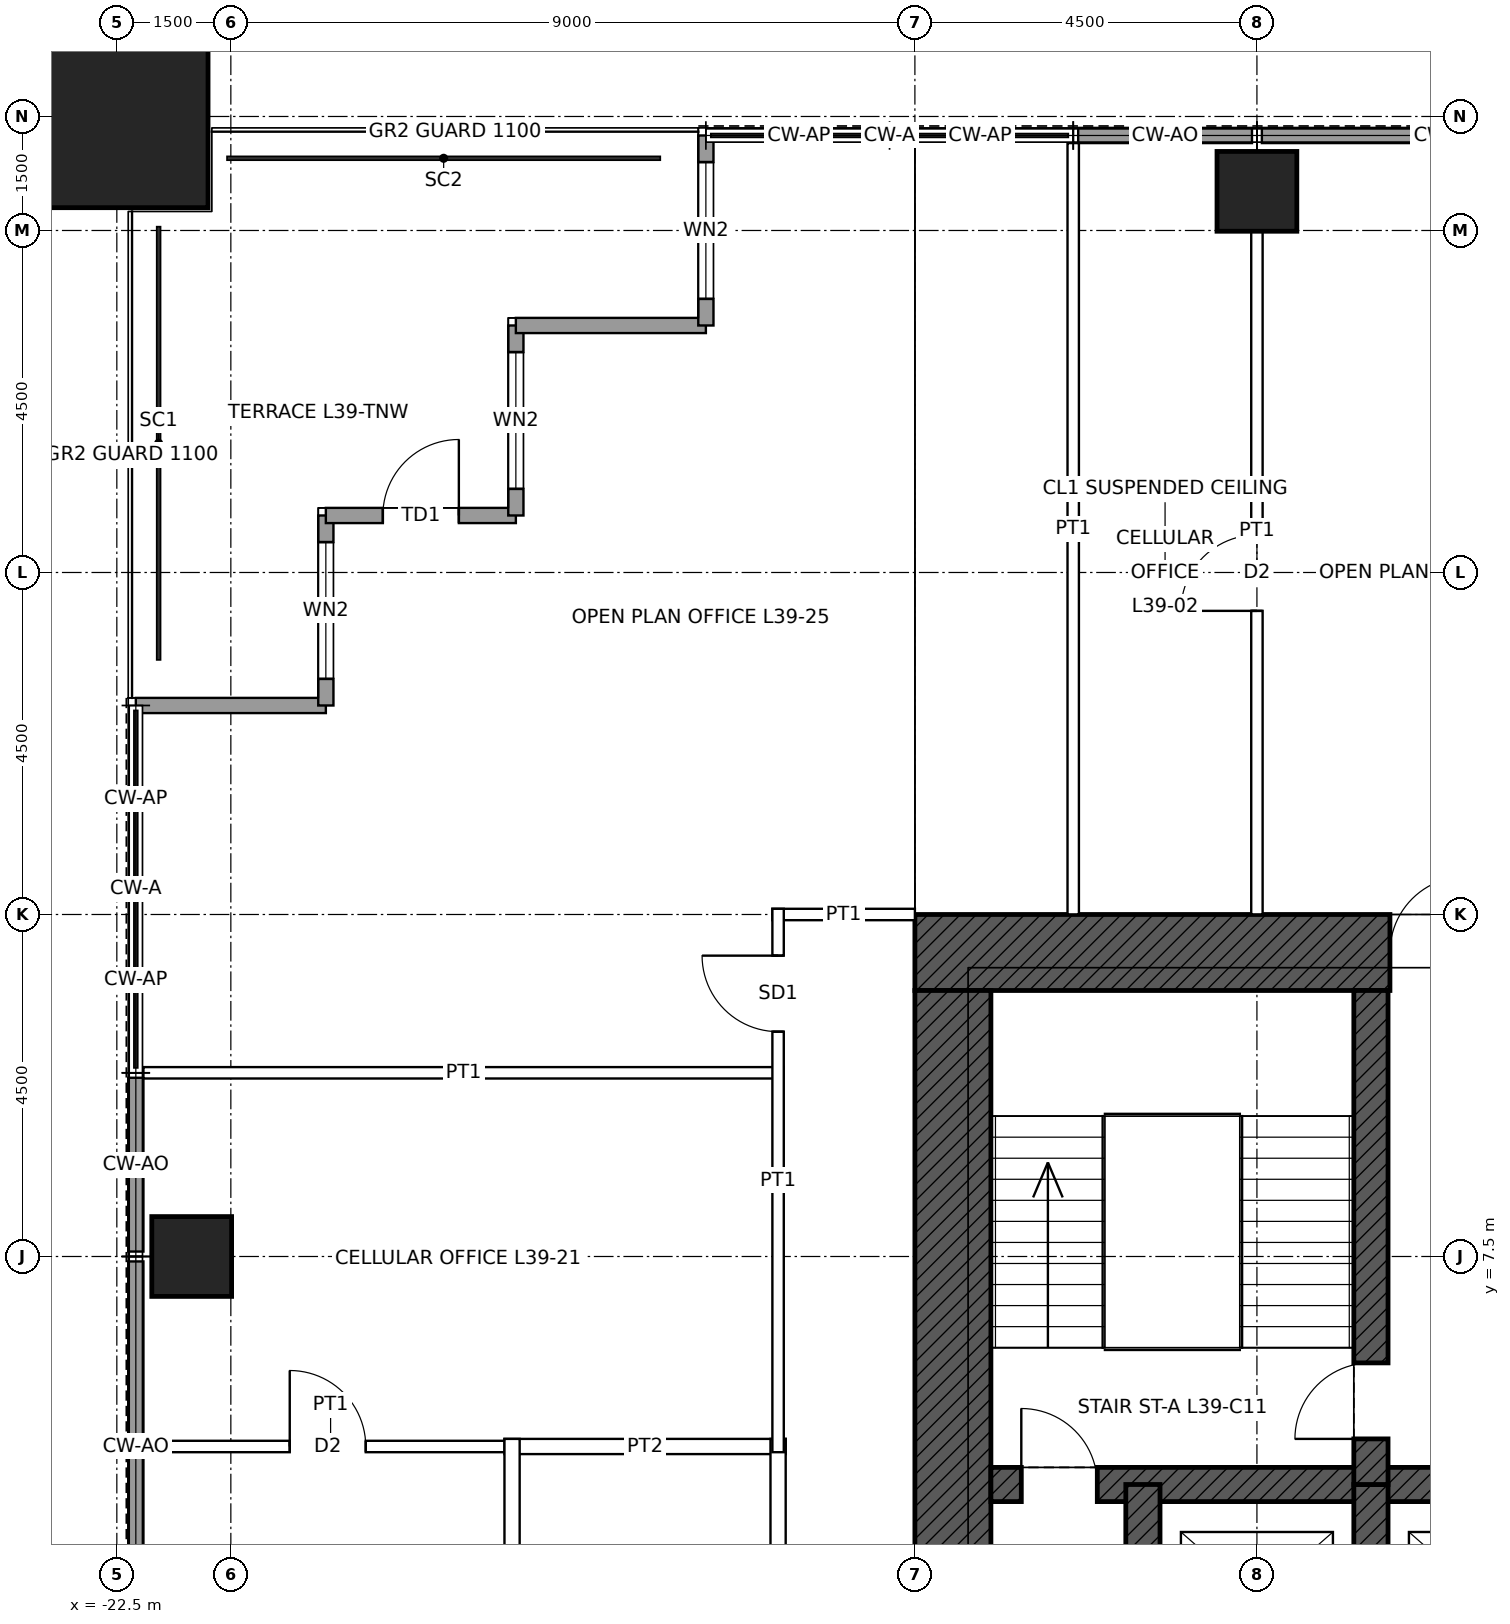
"""IFC4 building model, lengths in metres.
Left out: names, types, materials, properties, quantities, classifications, styles, units other than length and angle.
Written with IfcOpenShell. Run it as: python <this file> out.ifc"""

import sys

from ifc_helpers import new_model, si_unit, direction, frame, frame_2d, origin, origin_2d, place, context, subcontext, project, spatial, rectangle, hollow_rectangle, extrude, element, fill, save


model = new_model("IFC4")
c1 = context("Model", 3, precision=1e-05, world=origin(), true_north=direction((0.0, 1.0)))
c2 = subcontext(c1, "Body", "Model", "MODEL_VIEW")
j1 = project(units=[si_unit("LENGTHUNIT", "METRE"), si_unit("PLANEANGLEUNIT", "RADIAN")], contexts=[c1])
p1 = place(None, origin())
s1 = spatial("IfcSite", under=j1, at=p1, CompositionType="ELEMENT")
p2 = place(p1, origin())
s2 = spatial("IfcBuilding", under=s1, at=p2, CompositionType="ELEMENT")
p3 = place(p2, frame((0.0, 0.0, 189.9)))
s3 = spatial("IfcBuildingStorey", under=s2, at=p3, CompositionType="ELEMENT", Elevation=189.9)
p4 = place(p3, frame((-22.5, 22.5, 0.0), z_axis=(0.0, 0.0, 1.0), x_axis=(1.0, 0.0, 0.0)))
e1 = element("IfcColumn", 1, at=p4, inside=s3, PredefinedType="COLUMN", context=c2, shape_type="SweptSolid", body=[
    extrude(hollow_rectangle(XDim=2.4, YDim=2.4, WallThickness=0.12, at=origin_2d()), origin(), (0.0, 0.0, 1.0), 4.0),
])
for number, where, z_axis, x_axis in (
    (2, (-7.5, 21.515, 0.0), (0.0, 0.0, 1.0), (1.0, 0.0, 0.0)),
    (3, (-21.515, 7.5, 0.0), (0.0, 0.0, 1.0), (1.0, 0.0, 0.0)),
):
    element("IfcColumn", number, at=place(p3, frame(where, z_axis=z_axis, x_axis=x_axis)), inside=s3, PredefinedType="COLUMN", context=c2, shape_type="SweptSolid", body=[
        extrude(hollow_rectangle(XDim=1.05, YDim=1.05, WallThickness=0.07, at=origin_2d()), origin(), (0.0, 0.0, 1.0), 4.0),
    ])
p5 = place(p3, frame((-12.0, 11.5, 0.0), z_axis=(0.0, 0.0, 1.0), x_axis=(1.0, 0.0, 0.0)))
e4 = element("IfcWall", 4, at=p5, inside=s3, PredefinedType="SHEAR", context=c2, shape_type="SweptSolid", body=[
    extrude(rectangle(XDim=24.0, YDim=1.0, at=frame_2d((12.0, 0.0))), origin(), (0.0, 0.0, 1.0), 4.0),
])
p6 = place(p5, frame((6.25, 0.0, 0.0)))
e5 = element("IfcOpeningElement", 5, at=p6, cuts=e4, PredefinedType="OPENING", context=c2, shape_type="SweptSolid", body=[
    extrude(rectangle(XDim=1.0, YDim=2.4, at=frame_2d((0.5, 1.2))), frame((0.0, 0.51, 0.0), z_axis=(0.0, -1.0, 0.0), x_axis=(1.0, 0.0, 0.0)), (0.0, 0.0, 1.0), 1.02),
])
p7 = place(p5, frame((16.75, 0.0, 0.0)))
e6 = element("IfcOpeningElement", 6, at=p7, cuts=e4, PredefinedType="OPENING", context=c2, shape_type="SweptSolid", body=[
    extrude(rectangle(XDim=1.0, YDim=2.4, at=frame_2d((0.5, 1.2))), frame((0.0, 0.51, 0.0), z_axis=(0.0, -1.0, 0.0), x_axis=(1.0, 0.0, 0.0)), (0.0, 0.0, 1.0), 1.02),
])
p8 = place(p3, frame((-11.5, -11.0, 0.0), z_axis=(0.0, 0.0, 1.0), x_axis=(0.0, 1.0, 0.0)))
e7 = element("IfcWall", 7, at=p8, inside=s3, PredefinedType="SHEAR", context=c2, shape_type="SweptSolid", body=[
    extrude(rectangle(XDim=22.0, YDim=1.0, at=frame_2d((11.0, 0.0))), origin(), (0.0, 0.0, 1.0), 4.0),
])
p9 = place(p8, frame((10.5, 0.0, 0.0)))
e8 = element("IfcOpeningElement", 8, at=p9, cuts=e7, PredefinedType="OPENING", context=c2, shape_type="SweptSolid", body=[
    extrude(rectangle(XDim=1.0, YDim=2.4, at=frame_2d((0.5, 1.2))), frame((0.0, 0.51, 0.0), z_axis=(0.0, -1.0, 0.0), x_axis=(1.0, 0.0, 0.0)), (0.0, 0.0, 1.0), 1.02),
])
p10 = place(p3, frame((-11.0, 4.5, 0.0), z_axis=(0.0, 0.0, 1.0), x_axis=(1.0, 0.0, 0.0)))
e9 = element("IfcWall", 9, at=p10, inside=s3, PredefinedType="SHEAR", context=c2, shape_type="SweptSolid", body=[
    extrude(rectangle(XDim=22.0, YDim=0.45, at=frame_2d((11.0, 0.0))), origin(), (0.0, 0.0, 1.0), 4.0),
])
p11 = place(p10, frame((0.4, 0.0, 0.0)))
e10 = element("IfcOpeningElement", 10, at=p11, cuts=e9, PredefinedType="OPENING", context=c2, shape_type="SweptSolid", body=[
    extrude(rectangle(XDim=1.0, YDim=2.1, at=frame_2d((0.5, 1.05))), frame((0.0, 0.235, 0.0), z_axis=(0.0, -1.0, 0.0), x_axis=(1.0, 0.0, 0.0)), (0.0, 0.0, 1.0), 0.47),
])
p12 = place(p10, frame((20.6, 0.0, 0.0)))
e11 = element("IfcOpeningElement", 11, at=p12, cuts=e9, PredefinedType="OPENING", context=c2, shape_type="SweptSolid", body=[
    extrude(rectangle(XDim=1.0, YDim=2.1, at=frame_2d((0.5, 1.05))), frame((0.0, 0.235, 0.0), z_axis=(0.0, -1.0, 0.0), x_axis=(1.0, 0.0, 0.0)), (0.0, 0.0, 1.0), 0.47),
])
for number, where, z_axis, x_axis in (
    (12, (-9.0, 1.5, 0.0), (0.0, 0.0, 1.0), (0.0, 1.0, 0.0)),
    (13, (-6.0, 1.5, 0.0), (0.0, 0.0, 1.0), (0.0, 1.0, 0.0)),
):
    element("IfcWall", number, at=place(p3, frame(where, z_axis=z_axis, x_axis=x_axis)), inside=s3, PredefinedType="SHEAR", context=c2, shape_type="SweptSolid", body=[
        extrude(rectangle(XDim=3.0, YDim=0.45, at=frame_2d((1.5, 0.0))), origin(), (0.0, 0.0, 1.0), 4.0),
    ])
p13 = place(p3, frame((-6.0, 4.5, 0.0), z_axis=(0.0, 0.0, 1.0), x_axis=(0.0, 1.0, 0.0)))
e14 = element("IfcWall", 14, at=p13, inside=s3, PredefinedType="SHEAR", context=c2, shape_type="SweptSolid", body=[
    extrude(rectangle(XDim=6.5, YDim=0.45, at=frame_2d((3.25, 0.0))), origin(), (0.0, 0.0, 1.0), 4.0),
])
p14 = place(p13, frame((0.6, 0.0, 0.0)))
e15 = element("IfcOpeningElement", 15, at=p14, cuts=e14, PredefinedType="OPENING", context=c2, shape_type="SweptSolid", body=[
    extrude(rectangle(XDim=1.0, YDim=2.1, at=frame_2d((0.5, 1.05))), frame((0.0, 0.235, 0.0), z_axis=(0.0, -1.0, 0.0), x_axis=(1.0, 0.0, 0.0)), (0.0, 0.0, 1.0), 0.47),
])
p15 = place(p3, frame((-22.25, 14.75, 0.0), z_axis=(0.0, 0.0, 1.0), x_axis=(1.0, 0.0, 0.0)))
e16 = element("IfcWall", 16, at=p15, inside=s3, PredefinedType="SOLIDWALL", context=c2, shape_type="SweptSolid", body=[
    extrude(rectangle(XDim=2.5, YDim=0.2, at=frame_2d((1.25, 0.0))), origin(), (0.0, 0.0, 1.0), 3.85),
])
p16 = place(p3, frame((-19.75, 14.75, 0.0), z_axis=(0.0, 0.0, 1.0), x_axis=(0.0, 1.0, 0.0)))
e17 = element("IfcWall", 17, at=p16, inside=s3, PredefinedType="SOLIDWALL", context=c2, shape_type="SweptSolid", body=[
    extrude(rectangle(XDim=2.5, YDim=0.2, at=frame_2d((1.25, 0.0))), origin(), (0.0, 0.0, 1.0), 3.85),
])
p17 = place(p16, frame((0.35, 0.0, 0.3)))
e18 = element("IfcOpeningElement", 18, at=p17, cuts=e17, PredefinedType="OPENING", context=c2, shape_type="SweptSolid", body=[
    extrude(rectangle(XDim=1.8, YDim=2.4, at=frame_2d((0.9, 1.2))), frame((0.0, 0.11, 0.0), z_axis=(0.0, -1.0, 0.0), x_axis=(1.0, 0.0, 0.0)), (0.0, 0.0, 1.0), 0.22),
])
p18 = place(p3, frame((-19.75, 17.25, 0.0), z_axis=(0.0, 0.0, 1.0), x_axis=(1.0, 0.0, 0.0)))
e19 = element("IfcWall", 19, at=p18, inside=s3, PredefinedType="SOLIDWALL", context=c2, shape_type="SweptSolid", body=[
    extrude(rectangle(XDim=2.5, YDim=0.2, at=frame_2d((1.25, 0.0))), origin(), (0.0, 0.0, 1.0), 3.85),
])
p19 = place(p18, frame((0.75, 0.0, 0.0)))
e20 = element("IfcOpeningElement", 20, at=p19, cuts=e19, PredefinedType="OPENING", context=c2, shape_type="SweptSolid", body=[
    extrude(rectangle(XDim=1.0, YDim=2.4, at=frame_2d((0.5, 1.2))), frame((0.0, 0.11, 0.0), z_axis=(0.0, -1.0, 0.0), x_axis=(1.0, 0.0, 0.0)), (0.0, 0.0, 1.0), 0.22),
])
p20 = place(p3, frame((-17.25, 17.25, 0.0), z_axis=(0.0, 0.0, 1.0), x_axis=(0.0, 1.0, 0.0)))
e21 = element("IfcWall", 21, at=p20, inside=s3, PredefinedType="SOLIDWALL", context=c2, shape_type="SweptSolid", body=[
    extrude(rectangle(XDim=2.5, YDim=0.2, at=frame_2d((1.25, 0.0))), origin(), (0.0, 0.0, 1.0), 3.85),
])
p21 = place(p20, frame((0.35, 0.0, 0.3)))
e22 = element("IfcOpeningElement", 22, at=p21, cuts=e21, PredefinedType="OPENING", context=c2, shape_type="SweptSolid", body=[
    extrude(rectangle(XDim=1.8, YDim=2.4, at=frame_2d((0.9, 1.2))), frame((0.0, 0.11, 0.0), z_axis=(0.0, -1.0, 0.0), x_axis=(1.0, 0.0, 0.0)), (0.0, 0.0, 1.0), 0.22),
])
p22 = place(p3, frame((-17.25, 19.75, 0.0), z_axis=(0.0, 0.0, 1.0), x_axis=(1.0, 0.0, 0.0)))
e23 = element("IfcWall", 23, at=p22, inside=s3, PredefinedType="SOLIDWALL", context=c2, shape_type="SweptSolid", body=[
    extrude(rectangle(XDim=2.5, YDim=0.2, at=frame_2d((1.25, 0.0))), origin(), (0.0, 0.0, 1.0), 3.85),
])
p23 = place(p3, frame((-14.75, 19.75, 0.0), z_axis=(0.0, 0.0, 1.0), x_axis=(0.0, 1.0, 0.0)))
e24 = element("IfcWall", 24, at=p23, inside=s3, PredefinedType="SOLIDWALL", context=c2, shape_type="SweptSolid", body=[
    extrude(rectangle(XDim=2.5, YDim=0.2, at=frame_2d((1.25, 0.0))), origin(), (0.0, 0.0, 1.0), 3.85),
])
p24 = place(p23, frame((0.35, 0.0, 0.3)))
e25 = element("IfcOpeningElement", 25, at=p24, cuts=e24, PredefinedType="OPENING", context=c2, shape_type="SweptSolid", body=[
    extrude(rectangle(XDim=1.8, YDim=2.4, at=frame_2d((0.9, 1.2))), frame((0.0, 0.11, 0.0), z_axis=(0.0, -1.0, 0.0), x_axis=(1.0, 0.0, 0.0)), (0.0, 0.0, 1.0), 0.22),
])
p25 = place(p3, frame((-9.852, 22.25, 0.0), z_axis=(0.0, 0.0, 1.0), x_axis=(1.0, 0.0, 0.0)))
e26 = element("IfcWall", 26, at=p25, inside=s3, PredefinedType="SOLIDWALL", context=c2, shape_type="SweptSolid", body=[
    extrude(rectangle(XDim=2.287, YDim=0.2, at=frame_2d((1.144, 0.0))), origin(), (0.0, 0.0, 1.0), 3.85),
])
for number, where, z_axis, x_axis in (
    (27, (-7.435, 22.25, 0.0), (0.0, 0.0, 1.0), (1.0, 0.0, 0.0)),
    (28, (-22.25, 2.565, 0.0), (0.0, 0.0, 1.0), (0.0, 1.0, 0.0)),
    (29, (-22.25, 5.032, 0.0), (0.0, 0.0, 1.0), (0.0, 1.0, 0.0)),
):
    element("IfcWall", number, at=place(p3, frame(where, z_axis=z_axis, x_axis=x_axis)), inside=s3, PredefinedType="SOLIDWALL", context=c2, shape_type="SweptSolid", body=[
        extrude(rectangle(XDim=2.403, YDim=0.2, at=frame_2d((1.201, 0.0))), origin(), (0.0, 0.0, 1.0), 3.85),
    ])
p26 = place(p3, frame((-22.25, 7.565, 0.0), z_axis=(0.0, 0.0, 1.0), x_axis=(0.0, 1.0, 0.0)))
e30 = element("IfcWall", 30, at=p26, inside=s3, PredefinedType="SOLIDWALL", context=c2, shape_type="SweptSolid", body=[
    extrude(rectangle(XDim=2.287, YDim=0.2, at=frame_2d((1.144, 0.0))), origin(), (0.0, 0.0, 1.0), 3.85),
])
p27 = place(p3, frame((-22.15, 5.0, 0.0), z_axis=(0.0, 0.0, 1.0), x_axis=(1.0, 0.0, 0.0)))
e31 = element("IfcWall", 31, at=p27, inside=s3, PredefinedType="PARTITIONING", context=c2, shape_type="SweptSolid", body=[
    extrude(rectangle(XDim=4.925, YDim=0.15, at=frame_2d((2.462, 0.0))), origin(), (0.0, 0.0, 1.0), 3.85),
])
p28 = place(p27, frame((1.925, 0.0, 0.0)))
e32 = element("IfcOpeningElement", 32, at=p28, cuts=e31, PredefinedType="OPENING", context=c2, shape_type="SweptSolid", body=[
    extrude(rectangle(XDim=1.0, YDim=2.1, at=frame_2d((0.5, 1.05))), frame((0.0, 0.085, 0.0), z_axis=(0.0, -1.0, 0.0), x_axis=(1.0, 0.0, 0.0)), (0.0, 0.0, 1.0), 0.17),
])
p29 = place(p3, frame((-17.4, 5.0, 0.0), z_axis=(0.0, 0.0, 1.0), x_axis=(1.0, 0.0, 0.0)))
e33 = element("IfcWall", 33, at=p29, inside=s3, PredefinedType="PARTITIONING", context=c2, shape_type="SweptSolid", body=[
    extrude(rectangle(XDim=3.7, YDim=0.2, at=frame_2d((1.85, 0.0))), origin(), (0.0, 0.0, 1.0), 3.85),
])
p30 = place(p3, frame((-22.15, 9.917, 0.0), z_axis=(0.0, 0.0, 1.0), x_axis=(1.0, 0.0, 0.0)))
e34 = element("IfcWall", 34, at=p30, inside=s3, PredefinedType="PARTITIONING", context=c2, shape_type="SweptSolid", body=[
    extrude(rectangle(XDim=8.425, YDim=0.15, at=frame_2d((4.212, 0.0))), origin(), (0.0, 0.0, 1.0), 3.85),
])
p31 = place(p3, frame((-13.875, 12.0, 0.0), z_axis=(0.0, 0.0, 1.0), x_axis=(1.0, 0.0, 0.0)))
e35 = element("IfcWall", 35, at=p31, inside=s3, PredefinedType="PARTITIONING", context=c2, shape_type="SweptSolid", body=[
    extrude(rectangle(XDim=1.875, YDim=0.15, at=frame_2d((0.938, 0.0))), origin(), (0.0, 0.0, 1.0), 3.85),
])
p32 = place(p3, frame((-17.3, -0.1, 0.0), z_axis=(0.0, 0.0, 1.0), x_axis=(0.0, 1.0, 0.0)))
e36 = element("IfcWall", 36, at=p32, inside=s3, PredefinedType="PARTITIONING", context=c2, shape_type="SweptSolid", body=[
    extrude(rectangle(XDim=5.2, YDim=0.2, at=frame_2d((2.6, 0.0))), origin(), (0.0, 0.0, 1.0), 3.85),
])
p33 = place(p32, frame((2.1, 0.0, 0.0)))
e37 = element("IfcOpeningElement", 37, at=p33, cuts=e36, PredefinedType="OPENING", context=c2, shape_type="SweptSolid", body=[
    extrude(rectangle(XDim=1.0, YDim=2.1, at=frame_2d((0.5, 1.05))), frame((0.0, 0.11, 0.0), z_axis=(0.0, -1.0, 0.0), x_axis=(1.0, 0.0, 0.0)), (0.0, 0.0, 1.0), 0.22),
])
p34 = place(p3, frame((-13.8, -0.1, 0.0), z_axis=(0.0, 0.0, 1.0), x_axis=(0.0, 1.0, 0.0)))
e38 = element("IfcWall", 38, at=p34, inside=s3, PredefinedType="PARTITIONING", context=c2, shape_type="SweptSolid", body=[
    extrude(rectangle(XDim=5.2, YDim=0.2, at=frame_2d((2.6, 0.0))), origin(), (0.0, 0.0, 1.0), 3.85),
])
p35 = place(p3, frame((-13.8, 4.925, 0.0), z_axis=(0.0, 0.0, 1.0), x_axis=(0.0, 1.0, 0.0)))
e39 = element("IfcWall", 39, at=p35, inside=s3, PredefinedType="PARTITIONING", context=c2, shape_type="SweptSolid", body=[
    extrude(rectangle(XDim=7.15, YDim=0.15, at=frame_2d((3.575, 0.0))), origin(), (0.0, 0.0, 1.0), 3.85),
])
p36 = place(p35, frame((5.533, 0.0, 0.0)))
e40 = element("IfcOpeningElement", 40, at=p36, cuts=e39, PredefinedType="OPENING", context=c2, shape_type="SweptSolid", body=[
    extrude(rectangle(XDim=1.0, YDim=2.4, at=frame_2d((0.5, 1.2))), frame((0.0, 0.085, 0.0), z_axis=(0.0, -1.0, 0.0), x_axis=(1.0, 0.0, 0.0)), (0.0, 0.0, 1.0), 0.17),
])
p37 = place(p3, frame((-9.917, 12.0, 0.0), z_axis=(0.0, 0.0, 1.0), x_axis=(0.0, 1.0, 0.0)))
e41 = element("IfcWall", 41, at=p37, inside=s3, PredefinedType="PARTITIONING", context=c2, shape_type="SweptSolid", body=[
    extrude(rectangle(XDim=10.15, YDim=0.15, at=frame_2d((5.075, 0.0))), origin(), (0.0, 0.0, 1.0), 3.85),
])
p38 = place(p3, frame((-7.5, 12.0, 0.0), z_axis=(0.0, 0.0, 1.0), x_axis=(0.0, 1.0, 0.0)))
e42 = element("IfcWall", 42, at=p38, inside=s3, PredefinedType="PARTITIONING", context=c2, shape_type="SweptSolid", body=[
    extrude(rectangle(XDim=8.99, YDim=0.15, at=frame_2d((4.495, 0.0))), origin(), (0.0, 0.0, 1.0), 3.238),
])
p39 = place(p38, frame((3.995, 0.0, 0.0)))
e43 = element("IfcOpeningElement", 43, at=p39, cuts=e42, PredefinedType="OPENING", context=c2, shape_type="SweptSolid", body=[
    extrude(rectangle(XDim=1.0, YDim=2.1, at=frame_2d((0.5, 1.05))), frame((0.0, 0.085, 0.0), z_axis=(0.0, -1.0, 0.0), x_axis=(1.0, 0.0, 0.0)), (0.0, 0.0, 1.0), 0.17),
])
p40 = place(p17, origin())
e44 = element("IfcWindow", 44, at=p40, inside=s3, PartitioningType="SINGLE_PANEL", PredefinedType="WINDOW", context=c2, shape_type="SweptSolid", body=[
    extrude(rectangle(XDim=1.8, YDim=2.4, at=frame_2d((0.9, 1.2))), frame((0.0, 0.03, 0.0), z_axis=(0.0, -1.0, 0.0), x_axis=(1.0, 0.0, 0.0)), (0.0, 0.0, 1.0), 0.06),
])
fill(e18, e44)
p41 = place(p19, origin())
e45 = element("IfcDoor", 45, at=p41, inside=s3, OperationType="SINGLE_SWING_RIGHT", PredefinedType="DOOR", context=c2, shape_type="SweptSolid", body=[
    extrude(rectangle(XDim=1.0, YDim=2.4, at=frame_2d((0.5, 1.2))), frame((0.0, 0.025, 0.0), z_axis=(0.0, -1.0, 0.0), x_axis=(1.0, 0.0, 0.0)), (0.0, 0.0, 1.0), 0.05),
])
fill(e20, e45)
p42 = place(p21, origin())
e46 = element("IfcWindow", 46, at=p42, inside=s3, PartitioningType="SINGLE_PANEL", PredefinedType="WINDOW", context=c2, shape_type="SweptSolid", body=[
    extrude(rectangle(XDim=1.8, YDim=2.4, at=frame_2d((0.9, 1.2))), frame((0.0, 0.03, 0.0), z_axis=(0.0, -1.0, 0.0), x_axis=(1.0, 0.0, 0.0)), (0.0, 0.0, 1.0), 0.06),
])
fill(e22, e46)
p43 = place(p24, origin())
e47 = element("IfcWindow", 47, at=p43, inside=s3, PartitioningType="SINGLE_PANEL", PredefinedType="WINDOW", context=c2, shape_type="SweptSolid", body=[
    extrude(rectangle(XDim=1.8, YDim=2.4, at=frame_2d((0.9, 1.2))), frame((0.0, 0.03, 0.0), z_axis=(0.0, -1.0, 0.0), x_axis=(1.0, 0.0, 0.0)), (0.0, 0.0, 1.0), 0.06),
])
fill(e25, e47)
p44 = place(p11, origin())
e48 = element("IfcDoor", 48, at=p44, inside=s3, OperationType="SINGLE_SWING_LEFT", PredefinedType="DOOR", context=c2, shape_type="SweptSolid", body=[
    extrude(rectangle(XDim=1.0, YDim=2.1, at=frame_2d((0.5, 1.05))), frame((0.0, 0.025, 0.0), z_axis=(0.0, -1.0, 0.0), x_axis=(1.0, 0.0, 0.0)), (0.0, 0.0, 1.0), 0.05),
])
fill(e10, e48)
p45 = place(p14, origin())
e49 = element("IfcDoor", 49, at=p45, inside=s3, OperationType="SINGLE_SWING_LEFT", PredefinedType="DOOR", context=c2, shape_type="SweptSolid", body=[
    extrude(rectangle(XDim=1.0, YDim=2.1, at=frame_2d((0.5, 1.05))), frame((0.0, 0.025, 0.0), z_axis=(0.0, -1.0, 0.0), x_axis=(1.0, 0.0, 0.0)), (0.0, 0.0, 1.0), 0.05),
])
fill(e15, e49)
p46 = place(p6, origin())
e50 = element("IfcDoor", 50, at=p46, inside=s3, OperationType="SINGLE_SWING_RIGHT", PredefinedType="DOOR", context=c2, shape_type="SweptSolid", body=[
    extrude(rectangle(XDim=1.0, YDim=2.4, at=frame_2d((0.5, 1.2))), frame((0.0, 0.485, 0.0), z_axis=(0.0, -1.0, 0.0), x_axis=(1.0, 0.0, 0.0)), (0.0, 0.0, 1.0), 0.05),
])
fill(e5, e50)
p47 = place(p39, origin())
e51 = element("IfcDoor", 51, at=p47, inside=s3, OperationType="SINGLE_SWING_LEFT", PredefinedType="DOOR", context=c2, shape_type="SweptSolid", body=[
    extrude(rectangle(XDim=1.0, YDim=2.1, at=frame_2d((0.5, 1.05))), frame((0.0, 0.025, 0.0), z_axis=(0.0, -1.0, 0.0), x_axis=(1.0, 0.0, 0.0)), (0.0, 0.0, 1.0), 0.05),
])
fill(e43, e51)
p48 = place(p28, origin())
e52 = element("IfcDoor", 52, at=p48, inside=s3, OperationType="SINGLE_SWING_LEFT", PredefinedType="DOOR", context=c2, shape_type="SweptSolid", body=[
    extrude(rectangle(XDim=1.0, YDim=2.1, at=frame_2d((0.5, 1.05))), frame((0.0, 0.025, 0.0), z_axis=(0.0, -1.0, 0.0), x_axis=(1.0, 0.0, 0.0)), (0.0, 0.0, 1.0), 0.05),
])
fill(e32, e52)
p49 = place(p36, origin())
e53 = element("IfcDoor", 53, at=p49, inside=s3, OperationType="SINGLE_SWING_RIGHT", PredefinedType="DOOR", context=c2, shape_type="SweptSolid", body=[
    extrude(rectangle(XDim=1.0, YDim=2.4, at=frame_2d((0.5, 1.2))), frame((0.0, 0.025, 0.0), z_axis=(0.0, -1.0, 0.0), x_axis=(1.0, 0.0, 0.0)), (0.0, 0.0, 1.0), 0.05),
])
fill(e40, e53)
save(model, sys.argv[1])
